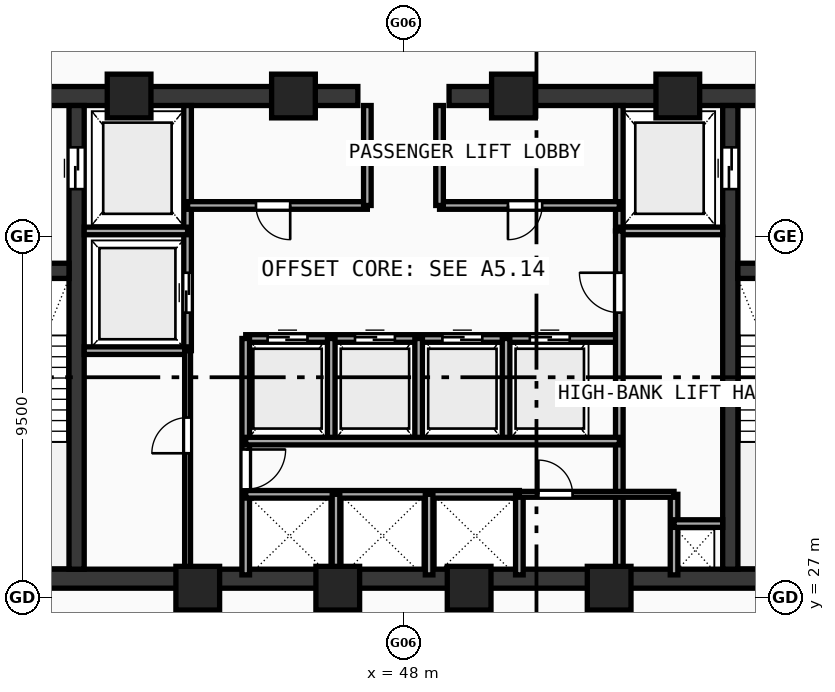
"""IFC4 building model, lengths in metres.
Left out: names, types, materials, properties, quantities, classifications, styles, units other than length and angle.
Written with IfcOpenShell. Run it as: python <this file> out.ifc"""

import sys

from ifc_helpers import new_model, si_unit, direction, frame, frame_2d, origin, origin_with_axes, origin_2d, place, context, subcontext, project, spatial, rectangle, hollow_rectangle, extrude, source, transform, mapped, element, fill, save


model = new_model("IFC4")
c1 = context("Model", 3, precision=1e-05, world=origin(), true_north=direction((0.0, 1.0)))
c2 = subcontext(c1, "Body", "Model", "MODEL_VIEW")
j1 = project(units=[si_unit("LENGTHUNIT", "METRE"), si_unit("PLANEANGLEUNIT", "RADIAN")], contexts=[c1])
p1 = place(None, origin())
s1 = spatial("IfcSite", under=j1, at=p1, CompositionType="ELEMENT")
p2 = place(p1, origin())
s2 = spatial("IfcBuilding", under=s1, at=p2, CompositionType="ELEMENT")
p3 = place(p2, frame((0.0, 0.0, 211.36)))
s3 = spatial("IfcBuildingStorey", under=s2, at=p3, CompositionType="ELEMENT", Elevation=211.36)
p4 = place(p3, frame((35.55, 27.5, 0.0), z_axis=(0.0, 0.0, 1.0), x_axis=(1.0, 0.0, 0.0)))
e1 = element("IfcWall", 1, at=p4, inside=s3, PredefinedType="SHEAR", context=c2, shape_type="SweptSolid", body=[
    extrude(rectangle(XDim=24.9, YDim=0.5, at=frame_2d((12.45, 0.0))), origin(), (0.0, 0.0, 1.0), 3.54),
])
p5 = place(p3, frame((35.55, 40.2, 0.0), z_axis=(0.0, 0.0, 1.0), x_axis=(1.0, 0.0, 0.0)))
e2 = element("IfcWall", 2, at=p5, inside=s3, PredefinedType="SHEAR", context=c2, shape_type="SweptSolid", body=[
    extrude(rectangle(XDim=11.25, YDim=0.5, at=frame_2d((5.625, 0.0))), origin(), (0.0, 0.0, 1.0), 3.54),
])
p6 = place(p5, frame((1.6, 0.0, 0.0)))
e3 = element("IfcOpeningElement", 3, at=p6, cuts=e2, PredefinedType="OPENING", context=c2, shape_type="SweptSolid", body=[
    extrude(rectangle(XDim=1.05, YDim=2.1, at=frame_2d((0.525, 1.05))), frame((0.0, 0.26, 0.0), z_axis=(0.0, -1.0, 0.0), x_axis=(1.0, 0.0, 0.0)), (0.0, 0.0, 1.0), 0.52),
])
p7 = place(p3, frame((49.2, 40.2, 0.0), z_axis=(0.0, 0.0, 1.0), x_axis=(1.0, 0.0, 0.0)))
e4 = element("IfcWall", 4, at=p7, inside=s3, PredefinedType="SHEAR", context=c2, shape_type="SweptSolid", body=[
    extrude(rectangle(XDim=11.25, YDim=0.5, at=frame_2d((5.625, 0.0))), origin(), (0.0, 0.0, 1.0), 3.54),
])
p8 = place(p7, frame((8.6, 0.0, 0.0)))
e5 = element("IfcOpeningElement", 5, at=p8, cuts=e4, PredefinedType="OPENING", context=c2, shape_type="SweptSolid", body=[
    extrude(rectangle(XDim=1.05, YDim=2.1, at=frame_2d((0.525, 1.05))), frame((0.0, 0.26, 0.0), z_axis=(0.0, -1.0, 0.0), x_axis=(1.0, 0.0, 0.0)), (0.0, 0.0, 1.0), 0.52),
])
p9 = place(p3, frame((39.4, 27.75, 0.0), z_axis=(0.0, 0.0, 1.0), x_axis=(0.0, 1.0, 0.0)))
e6 = element("IfcWall", 6, at=p9, inside=s3, PredefinedType="SHEAR", context=c2, shape_type="SweptSolid", body=[
    extrude(rectangle(XDim=12.2, YDim=0.4, at=frame_2d((6.1, 0.0))), origin(), (0.0, 0.0, 1.0), 3.54),
])
p10 = place(p9, frame((10.0, 0.0, 0.0)))
e7 = element("IfcOpeningElement", 7, at=p10, cuts=e6, PredefinedType="OPENING", context=c2, shape_type="SweptSolid", body=[
    extrude(rectangle(XDim=1.1, YDim=2.1, at=frame_2d((0.55, 1.05))), frame((0.0, 0.21, 0.0), z_axis=(0.0, -1.0, 0.0), x_axis=(1.0, 0.0, 0.0)), (0.0, 0.0, 1.0), 0.42),
])
p11 = place(p3, frame((56.6, 27.75, 0.0), z_axis=(0.0, 0.0, 1.0), x_axis=(0.0, 1.0, 0.0)))
e8 = element("IfcWall", 8, at=p11, inside=s3, PredefinedType="SHEAR", context=c2, shape_type="SweptSolid", body=[
    extrude(rectangle(XDim=12.2, YDim=0.4, at=frame_2d((6.1, 0.0))), origin(), (0.0, 0.0, 1.0), 3.54),
])
p12 = place(p11, frame((10.0, 0.0, 0.0)))
e9 = element("IfcOpeningElement", 9, at=p12, cuts=e8, PredefinedType="OPENING", context=c2, shape_type="SweptSolid", body=[
    extrude(rectangle(XDim=1.1, YDim=2.1, at=frame_2d((0.55, 1.05))), frame((0.0, 0.21, 0.0), z_axis=(0.0, -1.0, 0.0), x_axis=(1.0, 0.0, 0.0)), (0.0, 0.0, 1.0), 0.42),
])
p13 = place(p3, frame((36.05, 35.6, 0.0), z_axis=(0.0, 0.0, 1.0), x_axis=(1.0, 0.0, 0.0)))
e10 = element("IfcWall", 10, at=p13, inside=s3, PredefinedType="SHEAR", context=c2, shape_type="SweptSolid", body=[
    extrude(rectangle(XDim=3.15, YDim=0.4, at=frame_2d((1.575, 0.0))), origin(), (0.0, 0.0, 1.0), 3.54),
])
p14 = place(p13, frame((1.07, 0.0, 0.0)))
e11 = element("IfcOpeningElement", 11, at=p14, cuts=e10, PredefinedType="OPENING", context=c2, shape_type="SweptSolid", body=[
    extrude(rectangle(XDim=1.05, YDim=2.1, at=frame_2d((0.525, 1.05))), frame((0.0, 0.21, 0.0), z_axis=(0.0, -1.0, 0.0), x_axis=(1.0, 0.0, 0.0)), (0.0, 0.0, 1.0), 0.42),
])
p15 = place(p3, frame((56.8, 35.6, 0.0), z_axis=(0.0, 0.0, 1.0), x_axis=(1.0, 0.0, 0.0)))
e12 = element("IfcWall", 12, at=p15, inside=s3, PredefinedType="SHEAR", context=c2, shape_type="SweptSolid", body=[
    extrude(rectangle(XDim=3.15, YDim=0.4, at=frame_2d((1.575, 0.0))), origin(), (0.0, 0.0, 1.0), 3.54),
])
p16 = place(p15, frame((1.02, 0.0, 0.0)))
e13 = element("IfcOpeningElement", 13, at=p16, cuts=e12, PredefinedType="OPENING", context=c2, shape_type="SweptSolid", body=[
    extrude(rectangle(XDim=1.05, YDim=2.1, at=frame_2d((0.525, 1.05))), frame((0.0, 0.21, 0.0), z_axis=(0.0, -1.0, 0.0), x_axis=(1.0, 0.0, 0.0)), (0.0, 0.0, 1.0), 0.42),
])
m1 = source(origin(), c2, "Body", "SweptSolid", [
    extrude(hollow_rectangle(XDim=1.15, YDim=1.15, WallThickness=0.048, at=origin_2d()), origin(), (0.0, 0.0, 1.0), 3.8),
])
for number, where, z_axis, x_axis in (
    (14, (42.588, 27.25, -0.26), (0.0, 0.0, 1.0), (1.0, 0.0, 0.0)),
    (15, (46.272, 27.25, -0.26), (0.0, 0.0, 1.0), (1.0, 0.0, 0.0)),
    (16, (49.729, 27.25, -0.26), (0.0, 0.0, 1.0), (1.0, 0.0, 0.0)),
    (17, (53.412, 27.25, -0.26), (0.0, 0.0, 1.0), (1.0, 0.0, 0.0)),
    (18, (55.219, 40.2, -0.26), (0.0, 0.0, 1.0), (1.0, 0.0, 0.0)),
    (19, (50.894, 40.2, -0.26), (0.0, 0.0, 1.0), (1.0, 0.0, 0.0)),
    (20, (45.106, 40.2, -0.26), (0.0, 0.0, 1.0), (1.0, 0.0, 0.0)),
    (21, (40.781, 40.2, -0.26), (0.0, 0.0, 1.0), (1.0, 0.0, 0.0)),
):
    element("IfcColumn", number, at=place(p3, frame(where, z_axis=z_axis, x_axis=x_axis)), inside=s3, PredefinedType="COLUMN", context=c2, shape_type="MappedRepresentation", body=[
        mapped(m1, transform((0.0, 0.0, 0.0), scale=1.0)),
    ])
p17 = place(p3, frame((42.32, 33.5, 0.0), z_axis=(0.0, 0.0, 1.0), x_axis=(0.0, 1.0, 0.0)))
e22 = element("IfcWall", 22, at=p17, inside=s3, PredefinedType="SOLIDWALL", context=c2, shape_type="SweptSolid", body=[
    extrude(rectangle(XDim=6.45, YDim=0.2, at=frame_2d((3.225, 0.0))), origin(), (0.0, 0.0, 1.0), 3.54),
])
p18 = place(p17, frame((1.0, 0.0, 0.0)))
e23 = element("IfcOpeningElement", 23, at=p18, cuts=e22, PredefinedType="OPENING", context=c2, shape_type="SweptSolid", body=[
    extrude(rectangle(XDim=1.05, YDim=2.1, at=frame_2d((0.525, 1.05))), frame((0.0, 0.11, 0.0), z_axis=(0.0, -1.0, 0.0), x_axis=(1.0, 0.0, 0.0)), (0.0, 0.0, 1.0), 0.22),
])
for number, where, z_axis, x_axis in (
    (24, (39.6, 36.65, 0.0), (0.0, 0.0, 1.0), (1.0, 0.0, 0.0)),
    (25, (39.6, 33.5, 0.0), (0.0, 0.0, 1.0), (1.0, 0.0, 0.0)),
):
    element("IfcWall", number, at=place(p3, frame(where, z_axis=z_axis, x_axis=x_axis)), inside=s3, PredefinedType="SOLIDWALL", context=c2, shape_type="SweptSolid", body=[
        extrude(rectangle(XDim=2.72, YDim=0.2, at=frame_2d((1.36, 0.0))), origin(), (0.0, 0.0, 1.0), 3.54),
    ])
p19 = place(p3, frame((53.68, 36.65, 0.0), z_axis=(0.0, 0.0, 1.0), x_axis=(0.0, 1.0, 0.0)))
e26 = element("IfcWall", 26, at=p19, inside=s3, PredefinedType="SOLIDWALL", context=c2, shape_type="SweptSolid", body=[
    extrude(rectangle(XDim=3.3, YDim=0.2, at=frame_2d((1.65, 0.0))), origin(), (0.0, 0.0, 1.0), 3.54),
])
p20 = place(p3, frame((53.68, 36.65, 0.0), z_axis=(0.0, 0.0, 1.0), x_axis=(1.0, 0.0, 0.0)))
e27 = element("IfcWall", 27, at=p20, inside=s3, PredefinedType="SOLIDWALL", context=c2, shape_type="SweptSolid", body=[
    extrude(rectangle(XDim=2.72, YDim=0.2, at=frame_2d((1.36, 0.0))), origin(), (0.0, 0.0, 1.0), 3.54),
])
p21 = place(p3, frame((42.32, 37.32, 0.0), z_axis=(0.0, 0.0, 1.0), x_axis=(1.0, 0.0, 0.0)))
e28 = element("IfcWall", 28, at=p21, inside=s3, PredefinedType="SOLIDWALL", context=c2, shape_type="SweptSolid", body=[
    extrude(rectangle(XDim=4.73, YDim=0.2, at=frame_2d((2.365, 0.0))), origin(), (0.0, 0.0, 1.0), 3.54),
])
p22 = place(p21, frame((1.8, 0.0, 0.0)))
e29 = element("IfcOpeningElement", 29, at=p22, cuts=e28, PredefinedType="OPENING", context=c2, shape_type="SweptSolid", body=[
    extrude(rectangle(XDim=0.9, YDim=2.1, at=frame_2d((0.45, 1.05))), frame((0.0, 0.11, 0.0), z_axis=(0.0, -1.0, 0.0), x_axis=(1.0, 0.0, 0.0)), (0.0, 0.0, 1.0), 0.22),
])
p23 = place(p3, frame((48.95, 37.32, 0.0), z_axis=(0.0, 0.0, 1.0), x_axis=(1.0, 0.0, 0.0)))
e30 = element("IfcWall", 30, at=p23, inside=s3, PredefinedType="SOLIDWALL", context=c2, shape_type="SweptSolid", body=[
    extrude(rectangle(XDim=4.73, YDim=0.2, at=frame_2d((2.365, 0.0))), origin(), (0.0, 0.0, 1.0), 3.54),
])
p24 = place(p23, frame((1.8, 0.0, 0.0)))
e31 = element("IfcOpeningElement", 31, at=p24, cuts=e30, PredefinedType="OPENING", context=c2, shape_type="SweptSolid", body=[
    extrude(rectangle(XDim=0.9, YDim=2.1, at=frame_2d((0.45, 1.05))), frame((0.0, 0.11, 0.0), z_axis=(0.0, -1.0, 0.0), x_axis=(1.0, 0.0, 0.0)), (0.0, 0.0, 1.0), 0.22),
])
for number, where, z_axis, x_axis in (
    (32, (47.05, 37.32, 0.0), (0.0, 0.0, 1.0), (0.0, 1.0, 0.0)),
    (33, (48.95, 37.32, 0.0), (0.0, 0.0, 1.0), (0.0, 1.0, 0.0)),
):
    element("IfcWall", number, at=place(p3, frame(where, z_axis=z_axis, x_axis=x_axis)), inside=s3, PredefinedType="SOLIDWALL", context=c2, shape_type="SweptSolid", body=[
        extrude(rectangle(XDim=2.63, YDim=0.2, at=frame_2d((1.315, 0.0))), origin(), (0.0, 0.0, 1.0), 3.54),
    ])
p25 = place(p3, frame((43.85, 33.82, 0.0), z_axis=(0.0, 0.0, 1.0), x_axis=(1.0, 0.0, 0.0)))
e34 = element("IfcWall", 34, at=p25, inside=s3, PredefinedType="SOLIDWALL", context=c2, shape_type="SweptSolid", body=[
    extrude(rectangle(XDim=9.83, YDim=0.2, at=frame_2d((4.915, 0.0))), origin(), (0.0, 0.0, 1.0), 3.54),
])
p26 = place(p25, frame((0.575, 0.0, 0.0)))
e35 = element("IfcOpeningElement", 35, at=p26, cuts=e34, PredefinedType="OPENING", context=c2, shape_type="SweptSolid", body=[
    extrude(rectangle(XDim=1.05, YDim=2.1, at=frame_2d((0.525, 1.05))), frame((0.0, 0.11, 0.0), z_axis=(0.0, -1.0, 0.0), x_axis=(1.0, 0.0, 0.0)), (0.0, 0.0, 1.0), 0.22),
])
p27 = place(p25, frame((2.875, 0.0, 0.0)))
e36 = element("IfcOpeningElement", 36, at=p27, cuts=e34, PredefinedType="OPENING", context=c2, shape_type="SweptSolid", body=[
    extrude(rectangle(XDim=1.05, YDim=2.1, at=frame_2d((0.525, 1.05))), frame((0.0, 0.11, 0.0), z_axis=(0.0, -1.0, 0.0), x_axis=(1.0, 0.0, 0.0)), (0.0, 0.0, 1.0), 0.22),
])
p28 = place(p25, frame((5.175, 0.0, 0.0)))
e37 = element("IfcOpeningElement", 37, at=p28, cuts=e34, PredefinedType="OPENING", context=c2, shape_type="SweptSolid", body=[
    extrude(rectangle(XDim=1.05, YDim=2.1, at=frame_2d((0.525, 1.05))), frame((0.0, 0.11, 0.0), z_axis=(0.0, -1.0, 0.0), x_axis=(1.0, 0.0, 0.0)), (0.0, 0.0, 1.0), 0.22),
])
p29 = place(p25, frame((7.475, 0.0, 0.0)))
e38 = element("IfcOpeningElement", 38, at=p29, cuts=e34, PredefinedType="OPENING", context=c2, shape_type="SweptSolid", body=[
    extrude(rectangle(XDim=1.05, YDim=2.1, at=frame_2d((0.525, 1.05))), frame((0.0, 0.11, 0.0), z_axis=(0.0, -1.0, 0.0), x_axis=(1.0, 0.0, 0.0)), (0.0, 0.0, 1.0), 0.22),
])
p30 = place(p3, frame((43.85, 27.6, 0.0), z_axis=(0.0, 0.0, 1.0), x_axis=(0.0, 1.0, 0.0)))
e39 = element("IfcWall", 39, at=p30, inside=s3, PredefinedType="SOLIDWALL", context=c2, shape_type="SweptSolid", body=[
    extrude(rectangle(XDim=6.22, YDim=0.2, at=frame_2d((3.11, 0.0))), origin(), (0.0, 0.0, 1.0), 3.54),
])
p31 = place(p30, frame((2.25, 0.0, 0.0)))
e40 = element("IfcOpeningElement", 40, at=p31, cuts=e39, PredefinedType="OPENING", context=c2, shape_type="SweptSolid", body=[
    extrude(rectangle(XDim=1.05, YDim=2.1, at=frame_2d((0.525, 1.05))), frame((0.0, 0.11, 0.0), z_axis=(0.0, -1.0, 0.0), x_axis=(1.0, 0.0, 0.0)), (0.0, 0.0, 1.0), 0.22),
])
p32 = place(p3, frame((53.68, 27.6, 0.0), z_axis=(0.0, 0.0, 1.0), x_axis=(0.0, 1.0, 0.0)))
e41 = element("IfcWall", 41, at=p32, inside=s3, PredefinedType="SOLIDWALL", context=c2, shape_type="SweptSolid", body=[
    extrude(rectangle(XDim=9.05, YDim=0.2, at=frame_2d((4.525, 0.0))), origin(), (0.0, 0.0, 1.0), 3.54),
])
p33 = place(p32, frame((6.9, 0.0, 0.0)))
e42 = element("IfcOpeningElement", 42, at=p33, cuts=e41, PredefinedType="OPENING", context=c2, shape_type="SweptSolid", body=[
    extrude(rectangle(XDim=1.05, YDim=2.1, at=frame_2d((0.525, 1.05))), frame((0.0, 0.11, 0.0), z_axis=(0.0, -1.0, 0.0), x_axis=(1.0, 0.0, 0.0)), (0.0, 0.0, 1.0), 0.22),
])
for number, where, z_axis, x_axis in (
    (43, (46.1, 31.12, 0.0), (0.0, 0.0, 1.0), (0.0, 1.0, 0.0)),
    (44, (48.4, 31.12, 0.0), (0.0, 0.0, 1.0), (0.0, 1.0, 0.0)),
    (45, (50.7, 31.12, 0.0), (0.0, 0.0, 1.0), (0.0, 1.0, 0.0)),
):
    element("IfcWall", number, at=place(p3, frame(where, z_axis=z_axis, x_axis=x_axis)), inside=s3, PredefinedType="SOLIDWALL", context=c2, shape_type="SweptSolid", body=[
        extrude(rectangle(XDim=2.7, YDim=0.2, at=frame_2d((1.35, 0.0))), origin(), (0.0, 0.0, 1.0), 3.54),
    ])
p34 = place(p3, frame((43.85, 29.72, 0.0), z_axis=(0.0, 0.0, 1.0), x_axis=(1.0, 0.0, 0.0)))
e46 = element("IfcWall", 46, at=p34, inside=s3, PredefinedType="SOLIDWALL", context=c2, shape_type="SweptSolid", body=[
    extrude(rectangle(XDim=7.2, YDim=0.2, at=frame_2d((3.6, 0.0))), origin(), (0.0, 0.0, 1.0), 3.54),
])
p35 = place(p3, frame((51.05, 27.6, 0.0), z_axis=(0.0, 0.0, 1.0), x_axis=(0.0, 1.0, 0.0)))
e47 = element("IfcWall", 47, at=p35, inside=s3, PredefinedType="SOLIDWALL", context=c2, shape_type="SweptSolid", body=[
    extrude(rectangle(XDim=2.12, YDim=0.2, at=frame_2d((1.06, 0.0))), origin(), (0.0, 0.0, 1.0), 3.54),
])
p36 = place(p3, frame((43.85, 31.12, 0.0), z_axis=(0.0, 0.0, 1.0), x_axis=(1.0, 0.0, 0.0)))
e48 = element("IfcWall", 48, at=p36, inside=s3, PredefinedType="SOLIDWALL", context=c2, shape_type="SweptSolid", body=[
    extrude(rectangle(XDim=9.83, YDim=0.2, at=frame_2d((4.915, 0.0))), origin(), (0.0, 0.0, 1.0), 3.54),
])
for number, where, z_axis, x_axis in (
    (49, (46.225, 27.6, 0.0), (0.0, 0.0, 1.0), (0.0, 1.0, 0.0)),
    (50, (48.675, 27.6, 0.0), (0.0, 0.0, 1.0), (0.0, 1.0, 0.0)),
    (51, (55.12, 27.6, 0.0), (0.0, 0.0, 1.0), (0.0, 1.0, 0.0)),
):
    element("IfcWall", number, at=place(p3, frame(where, z_axis=z_axis, x_axis=x_axis)), inside=s3, PredefinedType="SOLIDWALL", context=c2, shape_type="SweptSolid", body=[
        extrude(rectangle(XDim=2.12, YDim=0.2, at=frame_2d((1.06, 0.0))), origin(), (0.0, 0.0, 1.0), 3.54),
    ])
p37 = place(p3, frame((55.12, 28.95, 0.0), z_axis=(0.0, 0.0, 1.0), x_axis=(1.0, 0.0, 0.0)))
e52 = element("IfcWall", 52, at=p37, inside=s3, PredefinedType="SOLIDWALL", context=c2, shape_type="SweptSolid", body=[
    extrude(rectangle(XDim=1.28, YDim=0.2, at=frame_2d((0.64, 0.0))), origin(), (0.0, 0.0, 1.0), 3.54),
])
p38 = place(p3, frame((42.32, 27.6, 0.0), z_axis=(0.0, 0.0, 1.0), x_axis=(0.0, 1.0, 0.0)))
e53 = element("IfcWall", 53, at=p38, inside=s3, PredefinedType="PARTITIONING", context=c2, shape_type="SweptSolid", body=[
    extrude(rectangle(XDim=5.9, YDim=0.155, at=frame_2d((2.95, 0.0))), origin(), (0.0, 0.0, 1.0), 3.54),
])
p39 = place(p38, frame((3.2, 0.0, 0.0)))
e54 = element("IfcOpeningElement", 54, at=p39, cuts=e53, PredefinedType="OPENING", context=c2, shape_type="SweptSolid", body=[
    extrude(rectangle(XDim=0.94, YDim=2.1, at=frame_2d((0.47, 1.05))), frame((0.0, 0.087, 0.0), z_axis=(0.0, -1.0, 0.0), x_axis=(1.0, 0.0, 0.0)), (0.0, 0.0, 1.0), 0.175),
])
p40 = place(p3, frame((51.05, 29.72, 0.0), z_axis=(0.0, 0.0, 1.0), x_axis=(1.0, 0.0, 0.0)))
e55 = element("IfcWall", 55, at=p40, inside=s3, PredefinedType="PARTITIONING", context=c2, shape_type="SweptSolid", body=[
    extrude(rectangle(XDim=4.07, YDim=0.155, at=frame_2d((2.035, 0.0))), origin(), (0.0, 0.0, 1.0), 3.54),
])
p41 = place(p40, frame((0.5, 0.0, 0.0)))
e56 = element("IfcOpeningElement", 56, at=p41, cuts=e55, PredefinedType="OPENING", context=c2, shape_type="SweptSolid", body=[
    extrude(rectangle(XDim=0.9, YDim=2.1, at=frame_2d((0.45, 1.05))), frame((0.0, 0.087, 0.0), z_axis=(0.0, -1.0, 0.0), x_axis=(1.0, 0.0, 0.0)), (0.0, 0.0, 1.0), 0.175),
])
m2 = source(origin(), c2, "Body", "SweptSolid", [
    extrude(rectangle(XDim=1.1, YDim=2.1, at=frame_2d((0.55, 1.05))), frame((0.0, 0.025, 0.0), z_axis=(0.0, -1.0, 0.0), x_axis=(1.0, 0.0, 0.0)), (0.0, 0.0, 1.0), 0.05),
])
p42 = place(p10, frame((1.1, 0.0, 0.0), z_axis=(0.0, 0.0, 1.0), x_axis=(-1.0, 0.0, 0.0)))
e57 = element("IfcDoor", 57, at=p42, inside=s3, OperationType="DOUBLE_DOOR_SLIDING", PredefinedType="DOOR", context=c2, shape_type="MappedRepresentation", body=[
    mapped(m2, transform((0.0, 0.0, 0.0), scale=1.0)),
])
fill(e7, e57)
p43 = place(p12, origin_with_axes())
e58 = element("IfcDoor", 58, at=p43, inside=s3, OperationType="DOUBLE_DOOR_SLIDING", PredefinedType="DOOR", context=c2, shape_type="MappedRepresentation", body=[
    mapped(m2, transform((0.0, 0.0, 0.0), scale=1.0)),
])
fill(e9, e58)
m3 = source(origin(), c2, "Body", "SweptSolid", [
    extrude(rectangle(XDim=1.05, YDim=2.1, at=frame_2d((0.525, 1.05))), frame((0.0, 0.025, 0.0), z_axis=(0.0, -1.0, 0.0), x_axis=(1.0, 0.0, 0.0)), (0.0, 0.0, 1.0), 0.05),
])
p44 = place(p18, origin_with_axes())
e59 = element("IfcDoor", 59, at=p44, inside=s3, OperationType="DOUBLE_DOOR_SLIDING", PredefinedType="DOOR", context=c2, shape_type="MappedRepresentation", body=[
    mapped(m3, transform((0.0, 0.0, 0.0), scale=1.0)),
])
fill(e23, e59)
m4 = source(origin(), c2, "Body", "SweptSolid", [
    extrude(rectangle(XDim=0.9, YDim=2.1, at=frame_2d((0.45, 1.05))), frame((0.0, 0.025, 0.0), z_axis=(0.0, -1.0, 0.0), x_axis=(1.0, 0.0, 0.0)), (0.0, 0.0, 1.0), 0.05),
])
p45 = place(p22, frame((0.9, 0.0, 0.0), z_axis=(0.0, 0.0, 1.0), x_axis=(-1.0, 0.0, 0.0)))
e60 = element("IfcDoor", 60, at=p45, inside=s3, OperationType="SINGLE_SWING_LEFT", PredefinedType="DOOR", context=c2, shape_type="MappedRepresentation", body=[
    mapped(m4, transform((0.0, 0.0, 0.0), scale=1.0)),
])
fill(e29, e60)
p46 = place(p24, frame((0.9, 0.0, 0.0), z_axis=(0.0, 0.0, 1.0), x_axis=(-1.0, 0.0, 0.0)))
e61 = element("IfcDoor", 61, at=p46, inside=s3, OperationType="SINGLE_SWING_RIGHT", PredefinedType="DOOR", context=c2, shape_type="MappedRepresentation", body=[
    mapped(m4, transform((0.0, 0.0, 0.0), scale=1.0)),
])
fill(e31, e61)
p47 = place(p26, origin_with_axes())
e62 = element("IfcDoor", 62, at=p47, inside=s3, OperationType="DOUBLE_DOOR_SLIDING", PredefinedType="DOOR", context=c2, shape_type="MappedRepresentation", body=[
    mapped(m3, transform((0.0, 0.0, 0.0), scale=1.0)),
])
fill(e35, e62)
p48 = place(p27, origin_with_axes())
e63 = element("IfcDoor", 63, at=p48, inside=s3, OperationType="DOUBLE_DOOR_SLIDING", PredefinedType="DOOR", context=c2, shape_type="MappedRepresentation", body=[
    mapped(m3, transform((0.0, 0.0, 0.0), scale=1.0)),
])
fill(e36, e63)
p49 = place(p28, origin_with_axes())
e64 = element("IfcDoor", 64, at=p49, inside=s3, OperationType="DOUBLE_DOOR_SLIDING", PredefinedType="DOOR", context=c2, shape_type="MappedRepresentation", body=[
    mapped(m3, transform((0.0, 0.0, 0.0), scale=1.0)),
])
fill(e37, e64)
p50 = place(p29, origin_with_axes())
e65 = element("IfcDoor", 65, at=p50, inside=s3, OperationType="DOUBLE_DOOR_SLIDING", PredefinedType="DOOR", context=c2, shape_type="MappedRepresentation", body=[
    mapped(m3, transform((0.0, 0.0, 0.0), scale=1.0)),
])
fill(e38, e65)
p51 = place(p31, frame((1.05, 0.0, 0.0), z_axis=(0.0, 0.0, 1.0), x_axis=(-1.0, 0.0, 0.0)))
e66 = element("IfcDoor", 66, at=p51, inside=s3, OperationType="SINGLE_SWING_LEFT", PredefinedType="DOOR", context=c2, shape_type="MappedRepresentation", body=[
    mapped(m3, transform((0.0, 0.0, 0.0), scale=1.0)),
])
fill(e40, e66)
p52 = place(p33, origin_with_axes())
e67 = element("IfcDoor", 67, at=p52, inside=s3, OperationType="SINGLE_SWING_RIGHT", PredefinedType="DOOR", context=c2, shape_type="MappedRepresentation", body=[
    mapped(m3, transform((0.0, 0.0, 0.0), scale=1.0)),
])
fill(e42, e67)
m5 = source(origin(), c2, "Body", "SweptSolid", [
    extrude(rectangle(XDim=0.94, YDim=2.1, at=frame_2d((0.47, 1.05))), frame((0.0, 0.025, 0.0), z_axis=(0.0, -1.0, 0.0), x_axis=(1.0, 0.0, 0.0)), (0.0, 0.0, 1.0), 0.05),
])
p53 = place(p39, origin_with_axes())
e68 = element("IfcDoor", 68, at=p53, inside=s3, OperationType="SINGLE_SWING_LEFT", PredefinedType="DOOR", context=c2, shape_type="MappedRepresentation", body=[
    mapped(m5, transform((0.0, 0.0, 0.0), scale=1.0)),
])
fill(e54, e68)
p54 = place(p41, origin_with_axes())
e69 = element("IfcDoor", 69, at=p54, inside=s3, OperationType="SINGLE_SWING_LEFT", PredefinedType="DOOR", context=c2, shape_type="MappedRepresentation", body=[
    mapped(m4, transform((0.0, 0.0, 0.0), scale=1.0)),
])
fill(e56, e69)
save(model, sys.argv[1])
